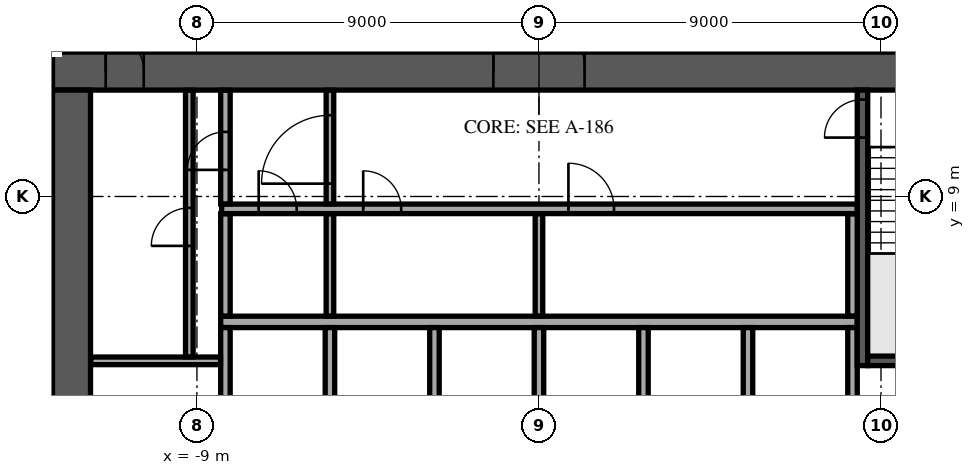
"""IFC4 building model, lengths in metres.
Left out: names, types, materials, properties, quantities, classifications, styles, units other than length and angle.
Written with IfcOpenShell. Run it as: python <this file> out.ifc"""

import sys

from ifc_helpers import new_model, si_unit, direction, frame, frame_2d, origin, place, context, subcontext, project, spatial, rectangle, extrude, element, fill, save


model = new_model("IFC4")
c1 = context("Model", 3, precision=1e-05, world=origin(), true_north=direction((0.0, 1.0)))
c2 = subcontext(c1, "Body", "Model", "MODEL_VIEW")
j1 = project(units=[si_unit("LENGTHUNIT", "METRE"), si_unit("PLANEANGLEUNIT", "RADIAN")], contexts=[c1])
p1 = place(None, origin())
s1 = spatial("IfcSite", under=j1, at=p1, CompositionType="ELEMENT")
p2 = place(p1, origin())
s2 = spatial("IfcBuilding", under=s1, at=p2, CompositionType="ELEMENT")
p3 = place(p2, frame((0.0, 0.0, 175.7)))
s3 = spatial("IfcBuildingStorey", under=s2, at=p3, CompositionType="ELEMENT", Elevation=175.7)
p4 = place(p3, frame((-12.8, 12.3, 0.0), z_axis=(0.0, 0.0, 1.0), x_axis=(1.0, 0.0, 0.0)))
e1 = element("IfcWall", 1, at=p4, inside=s3, PredefinedType="SHEAR", context=c2, shape_type="SweptSolid", body=[
    extrude(rectangle(XDim=25.6, YDim=1.0, at=frame_2d((12.8, 0.0))), origin(), (0.0, 0.0, 1.0), 3.6),
])
p5 = place(p4, frame((11.6, 0.0, 0.0)))
e2 = element("IfcOpeningElement", 2, at=p5, cuts=e1, PredefinedType="OPENING", context=c2, shape_type="SweptSolid", body=[
    extrude(rectangle(XDim=2.4, YDim=2.4, at=frame_2d((1.2, 1.2))), frame((0.0, 0.51, 0.0), z_axis=(0.0, -1.0, 0.0), x_axis=(1.0, 0.0, 0.0)), (0.0, 0.0, 1.0), 1.02),
])
p6 = place(p4, frame((22.425, 0.0, 0.0)))
e3 = element("IfcOpeningElement", 3, at=p6, cuts=e1, PredefinedType="OPENING", context=c2, shape_type="SweptSolid", body=[
    extrude(rectangle(XDim=1.2, YDim=2.1, at=frame_2d((0.6, 1.05))), frame((0.0, 0.51, 0.0), z_axis=(0.0, -1.0, 0.0), x_axis=(1.0, 0.0, 0.0)), (0.0, 0.0, 1.0), 1.02),
])
p7 = place(p4, frame((1.4, 0.0, 0.0)))
e4 = element("IfcOpeningElement", 4, at=p7, cuts=e1, PredefinedType="OPENING", context=c2, shape_type="SweptSolid", body=[
    extrude(rectangle(XDim=1.0, YDim=2.1, at=frame_2d((0.5, 1.05))), frame((0.0, 0.51, 0.0), z_axis=(0.0, -1.0, 0.0), x_axis=(1.0, 0.0, 0.0)), (0.0, 0.0, 1.0), 1.02),
])
p8 = place(p3, frame((-12.3, -11.8, 0.0), z_axis=(0.0, 0.0, 1.0), x_axis=(0.0, 1.0, 0.0)))
e5 = element("IfcWall", 5, at=p8, inside=s3, PredefinedType="SHEAR", context=c2, shape_type="SweptSolid", body=[
    extrude(rectangle(XDim=23.6, YDim=1.0, at=frame_2d((11.8, 0.0))), origin(), (0.0, 0.0, 1.0), 3.6),
])
p9 = place(p8, frame((10.6, 0.0, 0.0)))
e6 = element("IfcOpeningElement", 6, at=p9, cuts=e5, PredefinedType="OPENING", context=c2, shape_type="SweptSolid", body=[
    extrude(rectangle(XDim=2.4, YDim=2.4, at=frame_2d((1.2, 1.2))), frame((0.0, 0.51, 0.0), z_axis=(0.0, -1.0, 0.0), x_axis=(1.0, 0.0, 0.0)), (0.0, 0.0, 1.0), 1.02),
])
p10 = place(p3, frame((-8.375, 5.7, 0.0), z_axis=(0.0, 0.0, 1.0), x_axis=(1.0, 0.0, 0.0)))
e7 = element("IfcWall", 7, at=p10, inside=s3, PredefinedType="SOLIDWALL", context=c2, shape_type="SweptSolid", body=[
    extrude(rectangle(XDim=16.75, YDim=0.3, at=frame_2d((8.375, 0.0))), origin(), (0.0, 0.0, 1.0), 3.6),
])
for number, where, z_axis, x_axis in (
    (8, (-8.25, 2.85, 0.0), (0.0, 0.0, 1.0), (0.0, 1.0, 0.0)),
    (9, (-5.5, 2.85, 0.0), (0.0, 0.0, 1.0), (0.0, 1.0, 0.0)),
    (10, (-2.75, 2.85, 0.0), (0.0, 0.0, 1.0), (0.0, 1.0, 0.0)),
    (11, (0.0, 2.85, 0.0), (0.0, 0.0, 1.0), (0.0, 1.0, 0.0)),
    (12, (2.75, 2.85, 0.0), (0.0, 0.0, 1.0), (0.0, 1.0, 0.0)),
    (13, (5.5, 2.85, 0.0), (0.0, 0.0, 1.0), (0.0, 1.0, 0.0)),
    (14, (8.25, 2.85, 0.0), (0.0, 0.0, 1.0), (0.0, 1.0, 0.0)),
):
    element("IfcWall", number, at=place(p3, frame(where, z_axis=z_axis, x_axis=x_axis)), inside=s3, PredefinedType="SOLIDWALL", context=c2, shape_type="SweptSolid", body=[
        extrude(rectangle(XDim=2.7, YDim=0.25, at=frame_2d((1.35, 0.0))), origin(), (0.0, 0.0, 1.0), 3.6),
    ])
p11 = place(p3, frame((8.512, 4.55, 0.0), z_axis=(0.0, 0.0, 1.0), x_axis=(0.0, 1.0, 0.0)))
e15 = element("IfcWall", 15, at=p11, inside=s3, PredefinedType="SOLIDWALL", context=c2, shape_type="SweptSolid", body=[
    extrude(rectangle(XDim=7.25, YDim=0.275, at=frame_2d((3.625, 0.0))), origin(), (0.0, 0.0, 1.0), 3.6),
])
p12 = place(p11, frame((6.0, 0.0, 0.0)))
e16 = element("IfcOpeningElement", 16, at=p12, cuts=e15, PredefinedType="OPENING", context=c2, shape_type="SweptSolid", body=[
    extrude(rectangle(XDim=1.0, YDim=2.1, at=frame_2d((0.5, 1.05))), frame((0.0, 0.147, 0.0), z_axis=(0.0, -1.0, 0.0), x_axis=(1.0, 0.0, 0.0)), (0.0, 0.0, 1.0), 0.295),
])
p13 = place(p3, frame((8.65, 4.675, 0.0), z_axis=(0.0, 0.0, 1.0), x_axis=(1.0, 0.0, 0.0)))
e17 = element("IfcWall", 17, at=p13, inside=s3, PredefinedType="SOLIDWALL", context=c2, shape_type="SweptSolid", body=[
    extrude(rectangle(XDim=3.15, YDim=0.25, at=frame_2d((1.575, 0.0))), origin(), (0.0, 0.0, 1.0), 3.6),
])
p14 = place(p3, frame((-11.795, 4.675, 0.0), z_axis=(0.0, 0.0, 1.0), x_axis=(1.0, 0.0, 0.0)))
e18 = element("IfcWall", 18, at=p14, inside=s3, PredefinedType="PARTITIONING", context=c2, shape_type="SweptSolid", body=[
    extrude(rectangle(XDim=3.415, YDim=0.2, at=frame_2d((1.708, 0.0))), origin(), (0.0, 0.0, 1.0), 3.6),
])
p15 = place(p3, frame((-9.2, 4.78, 0.0), z_axis=(0.0, 0.0, 1.0), x_axis=(0.0, 1.0, 0.0)))
e19 = element("IfcWall", 19, at=p15, inside=s3, PredefinedType="PARTITIONING", context=c2, shape_type="SweptSolid", body=[
    extrude(rectangle(XDim=7.015, YDim=0.2, at=frame_2d((3.507, 0.0))), origin(), (0.0, 0.0, 1.0), 3.6),
])
p16 = place(p15, frame((2.92, 0.0, 0.0)))
e20 = element("IfcOpeningElement", 20, at=p16, cuts=e19, PredefinedType="OPENING", context=c2, shape_type="SweptSolid", body=[
    extrude(rectangle(XDim=1.0, YDim=2.1, at=frame_2d((0.5, 1.05))), frame((0.0, 0.11, 0.0), z_axis=(0.0, -1.0, 0.0), x_axis=(1.0, 0.0, 0.0)), (0.0, 0.0, 1.0), 0.22),
])
p17 = place(p3, frame((-8.25, 5.855, 0.0), z_axis=(0.0, 0.0, 1.0), x_axis=(0.0, 1.0, 0.0)))
e21 = element("IfcWall", 21, at=p17, inside=s3, PredefinedType="PARTITIONING", context=c2, shape_type="SweptSolid", body=[
    extrude(rectangle(XDim=2.69, YDim=0.25, at=frame_2d((1.345, 0.0))), origin(), (0.0, 0.0, 1.0), 3.6),
])
for number, where, z_axis, x_axis in (
    (22, (-5.5, 5.855, 0.0), (0.0, 0.0, 1.0), (0.0, 1.0, 0.0)),
    (23, (0.0, 5.855, 0.0), (0.0, 0.0, 1.0), (0.0, 1.0, 0.0)),
):
    element("IfcWall", number, at=place(p3, frame(where, z_axis=z_axis, x_axis=x_axis)), inside=s3, PredefinedType="PARTITIONING", context=c2, shape_type="SweptSolid", body=[
        extrude(rectangle(XDim=2.69, YDim=0.2, at=frame_2d((1.345, 0.0))), origin(), (0.0, 0.0, 1.0), 3.6),
    ])
p18 = place(p3, frame((8.25, 5.855, 0.0), z_axis=(0.0, 0.0, 1.0), x_axis=(0.0, 1.0, 0.0)))
e24 = element("IfcWall", 24, at=p18, inside=s3, PredefinedType="PARTITIONING", context=c2, shape_type="SweptSolid", body=[
    extrude(rectangle(XDim=2.69, YDim=0.25, at=frame_2d((1.345, 0.0))), origin(), (0.0, 0.0, 1.0), 3.6),
])
p19 = place(p3, frame((-8.35, 8.675, 0.0), z_axis=(0.0, 0.0, 1.0), x_axis=(1.0, 0.0, 0.0)))
e25 = element("IfcWall", 25, at=p19, inside=s3, PredefinedType="PARTITIONING", context=c2, shape_type="SweptSolid", body=[
    extrude(rectangle(XDim=16.72, YDim=0.25, at=frame_2d((8.36, 0.0))), origin(), (0.0, 0.0, 1.0), 3.6),
])
p20 = place(p19, frame((0.975, 0.0, 0.0)))
e26 = element("IfcOpeningElement", 26, at=p20, cuts=e25, PredefinedType="OPENING", context=c2, shape_type="SweptSolid", body=[
    extrude(rectangle(XDim=1.0, YDim=2.1, at=frame_2d((0.5, 1.05))), frame((0.0, 0.135, 0.0), z_axis=(0.0, -1.0, 0.0), x_axis=(1.0, 0.0, 0.0)), (0.0, 0.0, 1.0), 0.27),
])
p21 = place(p19, frame((3.725, 0.0, 0.0)))
e27 = element("IfcOpeningElement", 27, at=p21, cuts=e25, PredefinedType="OPENING", context=c2, shape_type="SweptSolid", body=[
    extrude(rectangle(XDim=1.0, YDim=2.1, at=frame_2d((0.5, 1.05))), frame((0.0, 0.135, 0.0), z_axis=(0.0, -1.0, 0.0), x_axis=(1.0, 0.0, 0.0)), (0.0, 0.0, 1.0), 0.27),
])
p22 = place(p19, frame((9.125, 0.0, 0.0)))
e28 = element("IfcOpeningElement", 28, at=p22, cuts=e25, PredefinedType="OPENING", context=c2, shape_type="SweptSolid", body=[
    extrude(rectangle(XDim=1.2, YDim=2.1, at=frame_2d((0.6, 1.05))), frame((0.0, 0.135, 0.0), z_axis=(0.0, -1.0, 0.0), x_axis=(1.0, 0.0, 0.0)), (0.0, 0.0, 1.0), 0.27),
])
p23 = place(p3, frame((-8.25, 8.805, 0.0), z_axis=(0.0, 0.0, 1.0), x_axis=(0.0, 1.0, 0.0)))
e29 = element("IfcWall", 29, at=p23, inside=s3, PredefinedType="PARTITIONING", context=c2, shape_type="SweptSolid", body=[
    extrude(rectangle(XDim=2.99, YDim=0.25, at=frame_2d((1.495, 0.0))), origin(), (0.0, 0.0, 1.0), 3.6),
])
p24 = place(p23, frame((0.895, 0.0, 0.0)))
e30 = element("IfcOpeningElement", 30, at=p24, cuts=e29, PredefinedType="OPENING", context=c2, shape_type="SweptSolid", body=[
    extrude(rectangle(XDim=1.0, YDim=2.1, at=frame_2d((0.5, 1.05))), frame((0.0, 0.135, 0.0), z_axis=(0.0, -1.0, 0.0), x_axis=(1.0, 0.0, 0.0)), (0.0, 0.0, 1.0), 0.27),
])
p25 = place(p3, frame((-5.5, 8.805, 0.0), z_axis=(0.0, 0.0, 1.0), x_axis=(0.0, 1.0, 0.0)))
e31 = element("IfcWall", 31, at=p25, inside=s3, PredefinedType="PARTITIONING", context=c2, shape_type="SweptSolid", body=[
    extrude(rectangle(XDim=2.99, YDim=0.2, at=frame_2d((1.495, 0.0))), origin(), (0.0, 0.0, 1.0), 3.6),
])
p26 = place(p25, frame((0.532, 0.0, 0.0)))
e32 = element("IfcOpeningElement", 32, at=p26, cuts=e31, PredefinedType="OPENING", context=c2, shape_type="SweptSolid", body=[
    extrude(rectangle(XDim=1.8, YDim=2.1, at=frame_2d((0.9, 1.05))), frame((0.0, 0.11, 0.0), z_axis=(0.0, -1.0, 0.0), x_axis=(1.0, 0.0, 0.0)), (0.0, 0.0, 1.0), 0.22),
])
p27 = place(p3, frame((3.238, 35.651, 0.0), z_axis=(0.0, 0.0, 1.0), x_axis=(-0.788009530914, -0.615663040298, 0.0)))
e33 = element("IfcWall", 33, at=p27, inside=s3, PredefinedType="STANDARD", context=c2, shape_type="SweptSolid", body=[
    extrude(rectangle(XDim=49.376, YDim=0.6, at=frame_2d((24.688, 0.0))), origin(), (0.0, 0.0, 1.0), 3.6),
])
p28 = place(p27, frame((1.2, 0.0, 0.9)))
e34 = element("IfcOpeningElement", 34, at=p28, cuts=e33, PredefinedType="OPENING", context=c2, shape_type="SweptSolid", body=[
    extrude(rectangle(XDim=2.1, YDim=2.1, at=frame_2d((1.05, 1.05))), frame((0.0, 0.31, 0.0), z_axis=(0.0, -1.0, 0.0), x_axis=(1.0, 0.0, 0.0)), (0.0, 0.0, 1.0), 0.62),
])
p29 = place(p27, frame((5.7, 0.0, 0.9)))
e35 = element("IfcOpeningElement", 35, at=p29, cuts=e33, PredefinedType="OPENING", context=c2, shape_type="SweptSolid", body=[
    extrude(rectangle(XDim=2.1, YDim=2.1, at=frame_2d((1.05, 1.05))), frame((0.0, 0.31, 0.0), z_axis=(0.0, -1.0, 0.0), x_axis=(1.0, 0.0, 0.0)), (0.0, 0.0, 1.0), 0.62),
])
p30 = place(p27, frame((10.2, 0.0, 0.9)))
e36 = element("IfcOpeningElement", 36, at=p30, cuts=e33, PredefinedType="OPENING", context=c2, shape_type="SweptSolid", body=[
    extrude(rectangle(XDim=2.1, YDim=2.1, at=frame_2d((1.05, 1.05))), frame((0.0, 0.31, 0.0), z_axis=(0.0, -1.0, 0.0), x_axis=(1.0, 0.0, 0.0)), (0.0, 0.0, 1.0), 0.62),
])
p31 = place(p27, frame((14.7, 0.0, 0.9)))
e37 = element("IfcOpeningElement", 37, at=p31, cuts=e33, PredefinedType="OPENING", context=c2, shape_type="SweptSolid", body=[
    extrude(rectangle(XDim=2.1, YDim=2.1, at=frame_2d((1.05, 1.05))), frame((0.0, 0.31, 0.0), z_axis=(0.0, -1.0, 0.0), x_axis=(1.0, 0.0, 0.0)), (0.0, 0.0, 1.0), 0.62),
])
p32 = place(p27, frame((19.2, 0.0, 0.9)))
e38 = element("IfcOpeningElement", 38, at=p32, cuts=e33, PredefinedType="OPENING", context=c2, shape_type="SweptSolid", body=[
    extrude(rectangle(XDim=2.1, YDim=2.1, at=frame_2d((1.05, 1.05))), frame((0.0, 0.31, 0.0), z_axis=(0.0, -1.0, 0.0), x_axis=(1.0, 0.0, 0.0)), (0.0, 0.0, 1.0), 0.62),
])
p33 = place(p27, frame((23.7, 0.0, 0.9)))
e39 = element("IfcOpeningElement", 39, at=p33, cuts=e33, PredefinedType="OPENING", context=c2, shape_type="SweptSolid", body=[
    extrude(rectangle(XDim=2.1, YDim=2.1, at=frame_2d((1.05, 1.05))), frame((0.0, 0.31, 0.0), z_axis=(0.0, -1.0, 0.0), x_axis=(1.0, 0.0, 0.0)), (0.0, 0.0, 1.0), 0.62),
])
p34 = place(p27, frame((28.2, 0.0, 0.9)))
e40 = element("IfcOpeningElement", 40, at=p34, cuts=e33, PredefinedType="OPENING", context=c2, shape_type="SweptSolid", body=[
    extrude(rectangle(XDim=2.1, YDim=2.1, at=frame_2d((1.05, 1.05))), frame((0.0, 0.31, 0.0), z_axis=(0.0, -1.0, 0.0), x_axis=(1.0, 0.0, 0.0)), (0.0, 0.0, 1.0), 0.62),
])
p35 = place(p27, frame((32.7, 0.0, 0.9)))
e41 = element("IfcOpeningElement", 41, at=p35, cuts=e33, PredefinedType="OPENING", context=c2, shape_type="SweptSolid", body=[
    extrude(rectangle(XDim=2.1, YDim=2.1, at=frame_2d((1.05, 1.05))), frame((0.0, 0.31, 0.0), z_axis=(0.0, -1.0, 0.0), x_axis=(1.0, 0.0, 0.0)), (0.0, 0.0, 1.0), 0.62),
])
p36 = place(p27, frame((37.2, 0.0, 0.9)))
e42 = element("IfcOpeningElement", 42, at=p36, cuts=e33, PredefinedType="OPENING", context=c2, shape_type="SweptSolid", body=[
    extrude(rectangle(XDim=2.1, YDim=2.1, at=frame_2d((1.05, 1.05))), frame((0.0, 0.31, 0.0), z_axis=(0.0, -1.0, 0.0), x_axis=(1.0, 0.0, 0.0)), (0.0, 0.0, 1.0), 0.62),
])
p37 = place(p27, frame((41.7, 0.0, 0.9)))
e43 = element("IfcOpeningElement", 43, at=p37, cuts=e33, PredefinedType="OPENING", context=c2, shape_type="SweptSolid", body=[
    extrude(rectangle(XDim=2.1, YDim=2.1, at=frame_2d((1.05, 1.05))), frame((0.0, 0.31, 0.0), z_axis=(0.0, -1.0, 0.0), x_axis=(1.0, 0.0, 0.0)), (0.0, 0.0, 1.0), 0.62),
])
p38 = place(p27, frame((46.138, 0.0, 0.9)))
e44 = element("IfcOpeningElement", 44, at=p38, cuts=e33, PredefinedType="OPENING", context=c2, shape_type="SweptSolid", body=[
    extrude(rectangle(XDim=2.1, YDim=2.1, at=frame_2d((1.05, 1.05))), frame((0.0, 0.31, 0.0), z_axis=(0.0, -1.0, 0.0), x_axis=(1.0, 0.0, 0.0)), (0.0, 0.0, 1.0), 0.62),
])
p39 = place(p3, frame((-24.433, 5.734, 0.0), z_axis=(0.0, 0.0, 1.0), x_axis=(0.788010131951, 0.615662271008, 0.0)))
e45 = element("IfcWall", 45, at=p39, inside=s3, PredefinedType="PARTITIONING", context=c2, shape_type="SweptSolid", body=[
    extrude(rectangle(XDim=31.448, YDim=0.15, at=frame_2d((15.724, 0.0))), origin(), (0.0, 0.0, 1.0), 3.15),
])
p40 = place(p39, frame((13.108, 0.0, 0.0)))
e46 = element("IfcOpeningElement", 46, at=p40, cuts=e45, PredefinedType="OPENING", context=c2, shape_type="SweptSolid", body=[
    extrude(rectangle(XDim=1.0, YDim=2.1, at=frame_2d((0.5, 1.05))), frame((0.0, 0.085, 0.0), z_axis=(0.0, -1.0, 0.0), x_axis=(1.0, 0.0, 0.0)), (0.0, 0.0, 1.0), 0.17),
])
p41 = place(p39, frame((23.227, 0.0, 0.0)))
e47 = element("IfcOpeningElement", 47, at=p41, cuts=e45, PredefinedType="OPENING", context=c2, shape_type="SweptSolid", body=[
    extrude(rectangle(XDim=1.0, YDim=2.1, at=frame_2d((0.5, 1.05))), frame((0.0, 0.085, 0.0), z_axis=(0.0, -1.0, 0.0), x_axis=(1.0, 0.0, 0.0)), (0.0, 0.0, 1.0), 0.17),
])
p42 = place(p5, origin())
e48 = element("IfcDoor", 48, at=p42, inside=s3, OperationType="SINGLE_SWING_LEFT", PredefinedType="DOOR", context=c2, shape_type="SweptSolid", body=[
    extrude(rectangle(XDim=2.4, YDim=2.4, at=frame_2d((1.2, 1.2))), frame((0.0, 0.025, 0.0), z_axis=(0.0, -1.0, 0.0), x_axis=(1.0, 0.0, 0.0)), (0.0, 0.0, 1.0), 0.05),
])
fill(e2, e48)
p43 = place(p7, origin())
e49 = element("IfcDoor", 49, at=p43, inside=s3, OperationType="SINGLE_SWING_LEFT", PredefinedType="DOOR", context=c2, shape_type="SweptSolid", body=[
    extrude(rectangle(XDim=1.0, YDim=2.1, at=frame_2d((0.5, 1.05))), frame((0.0, 0.025, 0.0), z_axis=(0.0, -1.0, 0.0), x_axis=(1.0, 0.0, 0.0)), (0.0, 0.0, 1.0), 0.05),
])
fill(e4, e49)
p44 = place(p12, origin())
e50 = element("IfcDoor", 50, at=p44, inside=s3, OperationType="SINGLE_SWING_LEFT", PredefinedType="DOOR", context=c2, shape_type="SweptSolid", body=[
    extrude(rectangle(XDim=1.0, YDim=2.1, at=frame_2d((0.5, 1.05))), frame((0.0, 0.025, 0.0), z_axis=(0.0, -1.0, 0.0), x_axis=(1.0, 0.0, 0.0)), (0.0, 0.0, 1.0), 0.05),
])
fill(e16, e50)
p45 = place(p16, origin())
e51 = element("IfcDoor", 51, at=p45, inside=s3, OperationType="SINGLE_SWING_RIGHT", PredefinedType="DOOR", context=c2, shape_type="SweptSolid", body=[
    extrude(rectangle(XDim=1.0, YDim=2.1, at=frame_2d((0.5, 1.05))), frame((0.0, 0.025, 0.0), z_axis=(0.0, -1.0, 0.0), x_axis=(1.0, 0.0, 0.0)), (0.0, 0.0, 1.0), 0.05),
])
fill(e20, e51)
p46 = place(p24, origin())
e52 = element("IfcDoor", 52, at=p46, inside=s3, OperationType="SINGLE_SWING_RIGHT", PredefinedType="DOOR", context=c2, shape_type="SweptSolid", body=[
    extrude(rectangle(XDim=1.0, YDim=2.1, at=frame_2d((0.5, 1.05))), frame((0.0, 0.025, 0.0), z_axis=(0.0, -1.0, 0.0), x_axis=(1.0, 0.0, 0.0)), (0.0, 0.0, 1.0), 0.05),
])
fill(e30, e52)
p47 = place(p20, origin())
e53 = element("IfcDoor", 53, at=p47, inside=s3, OperationType="SINGLE_SWING_RIGHT", PredefinedType="DOOR", context=c2, shape_type="SweptSolid", body=[
    extrude(rectangle(XDim=1.0, YDim=2.1, at=frame_2d((0.5, 1.05))), frame((0.0, 0.025, 0.0), z_axis=(0.0, -1.0, 0.0), x_axis=(1.0, 0.0, 0.0)), (0.0, 0.0, 1.0), 0.05),
])
fill(e26, e53)
p48 = place(p21, origin())
e54 = element("IfcDoor", 54, at=p48, inside=s3, OperationType="SINGLE_SWING_RIGHT", PredefinedType="DOOR", context=c2, shape_type="SweptSolid", body=[
    extrude(rectangle(XDim=1.0, YDim=2.1, at=frame_2d((0.5, 1.05))), frame((0.0, 0.025, 0.0), z_axis=(0.0, -1.0, 0.0), x_axis=(1.0, 0.0, 0.0)), (0.0, 0.0, 1.0), 0.05),
])
fill(e27, e54)
p49 = place(p22, origin())
e55 = element("IfcDoor", 55, at=p49, inside=s3, OperationType="SINGLE_SWING_LEFT", PredefinedType="DOOR", context=c2, shape_type="SweptSolid", body=[
    extrude(rectangle(XDim=1.2, YDim=2.1, at=frame_2d((0.6, 1.05))), frame((0.0, 0.025, 0.0), z_axis=(0.0, -1.0, 0.0), x_axis=(1.0, 0.0, 0.0)), (0.0, 0.0, 1.0), 0.05),
])
fill(e28, e55)
p50 = place(p26, origin())
e56 = element("IfcDoor", 56, at=p50, inside=s3, OperationType="SINGLE_SWING_LEFT", PredefinedType="DOOR", context=c2, shape_type="SweptSolid", body=[
    extrude(rectangle(XDim=1.8, YDim=2.1, at=frame_2d((0.9, 1.05))), frame((0.0, 0.025, 0.0), z_axis=(0.0, -1.0, 0.0), x_axis=(1.0, 0.0, 0.0)), (0.0, 0.0, 1.0), 0.05),
])
fill(e32, e56)
save(model, sys.argv[1])
